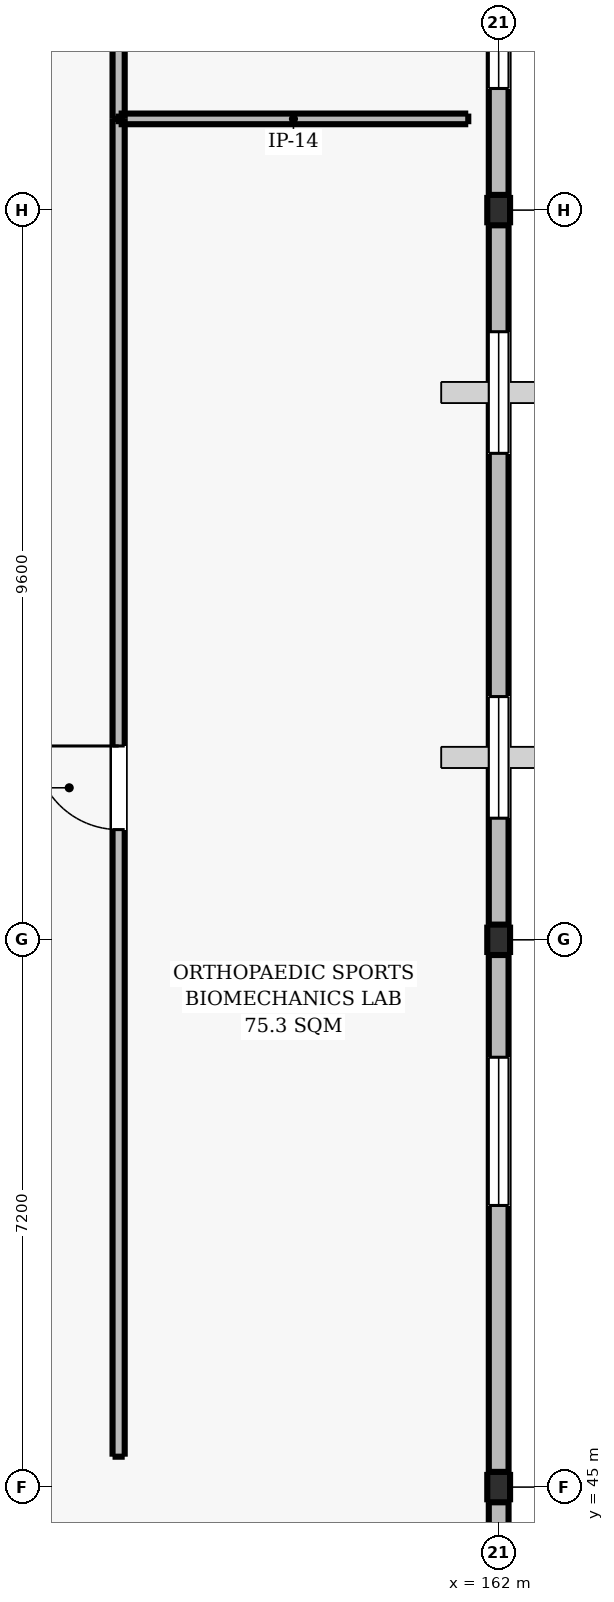
"""IFC4 building model, lengths in metres.
Left out: names, types, materials, properties, quantities, classifications, styles, units other than length and angle.
Written with IfcOpenShell. Run it as: python <this file> out.ifc"""

import sys

from ifc_helpers import new_model, si_unit, direction, frame, frame_2d, origin, origin_2d, place, context, subcontext, project, spatial, rectangle, i_section, extrude, element, fill, save


model = new_model("IFC4")
c1 = context("Model", 3, precision=1e-05, world=origin(), true_north=direction((0.0, 1.0)))
c2 = subcontext(c1, "Body", "Model", "MODEL_VIEW")
j1 = project(units=[si_unit("LENGTHUNIT", "METRE"), si_unit("PLANEANGLEUNIT", "RADIAN")], contexts=[c1])
p1 = place(None, origin())
s1 = spatial("IfcSite", under=j1, at=p1, CompositionType="ELEMENT")
p2 = place(p1, origin())
s2 = spatial("IfcBuilding", under=s1, at=p2, CompositionType="ELEMENT")
p3 = place(p2, frame((0.0, 0.0, 9.6)))
s3 = spatial("IfcBuildingStorey", under=s2, at=p3, CompositionType="ELEMENT", Elevation=9.6)
for number, where, z_axis, x_axis in (
    (1, (162.0, 45.0, 0.0), (0.0, 0.0, 1.0), (1.0, 0.0, 0.0)),
    (2, (162.0, 52.2, 0.0), (0.0, 0.0, 1.0), (1.0, 0.0, 0.0)),
    (3, (162.0, 61.8, 0.0), (0.0, 0.0, 1.0), (1.0, 0.0, 0.0)),
):
    element("IfcColumn", number, at=place(p3, frame(where, z_axis=z_axis, x_axis=x_axis)), inside=s3, PredefinedType="COLUMN", context=c2, shape_type="SweptSolid", body=[
        extrude(i_section(OverallWidth=0.3, OverallDepth=0.4, WebThickness=0.013, FlangeThickness=0.024, FilletRadius=0.027, at=origin_2d()), origin(), (0.0, 0.0, 1.0), 4.2),
    ])
p4 = place(p3, frame((162.0, 81.0, 0.0), z_axis=(0.0, 0.0, 1.0), x_axis=(0.0, -1.0, 0.0)))
e4 = element("IfcWall", 4, at=p4, inside=s3, PredefinedType="SOLIDWALL", context=c2, shape_type="SweptSolid", body=[
    extrude(rectangle(XDim=28.8, YDim=0.26, at=frame_2d((14.4, 0.0))), origin(), (0.0, 0.0, 1.0), 3.53),
])
p5 = place(p4, frame((1.6, 0.0, 0.965)))
e5 = element("IfcOpeningElement", 5, at=p5, cuts=e4, PredefinedType="OPENING", context=c2, shape_type="SweptSolid", body=[
    extrude(rectangle(XDim=1.6, YDim=1.6, at=frame_2d((0.8, 0.8))), frame((0.0, 0.14, 0.0), z_axis=(0.0, -1.0, 0.0), x_axis=(1.0, 0.0, 0.0)), (0.0, 0.0, 1.0), 0.28),
])
p6 = place(p4, frame((6.4, 0.0, 0.965)))
e6 = element("IfcOpeningElement", 6, at=p6, cuts=e4, PredefinedType="OPENING", context=c2, shape_type="SweptSolid", body=[
    extrude(rectangle(XDim=1.6, YDim=1.6, at=frame_2d((0.8, 0.8))), frame((0.0, 0.14, 0.0), z_axis=(0.0, -1.0, 0.0), x_axis=(1.0, 0.0, 0.0)), (0.0, 0.0, 1.0), 0.28),
])
p7 = place(p4, frame((11.2, 0.0, 0.965)))
e7 = element("IfcOpeningElement", 7, at=p7, cuts=e4, PredefinedType="OPENING", context=c2, shape_type="SweptSolid", body=[
    extrude(rectangle(XDim=1.6, YDim=1.6, at=frame_2d((0.8, 0.8))), frame((0.0, 0.14, 0.0), z_axis=(0.0, -1.0, 0.0), x_axis=(1.0, 0.0, 0.0)), (0.0, 0.0, 1.0), 0.28),
])
p8 = place(p4, frame((16.0, 0.0, 0.965)))
e8 = element("IfcOpeningElement", 8, at=p8, cuts=e4, PredefinedType="OPENING", context=c2, shape_type="SweptSolid", body=[
    extrude(rectangle(XDim=1.6, YDim=1.6, at=frame_2d((0.8, 0.8))), frame((0.0, 0.14, 0.0), z_axis=(0.0, -1.0, 0.0), x_axis=(1.0, 0.0, 0.0)), (0.0, 0.0, 1.0), 0.28),
])
p9 = place(p4, frame((20.8, 0.0, 0.965)))
e9 = element("IfcOpeningElement", 9, at=p9, cuts=e4, PredefinedType="OPENING", context=c2, shape_type="SweptSolid", body=[
    extrude(rectangle(XDim=1.6, YDim=1.6, at=frame_2d((0.8, 0.8))), frame((0.0, 0.14, 0.0), z_axis=(0.0, -1.0, 0.0), x_axis=(1.0, 0.0, 0.0)), (0.0, 0.0, 1.0), 0.28),
])
p10 = place(p4, frame((25.6, 0.0, 0.965)))
e10 = element("IfcOpeningElement", 10, at=p10, cuts=e4, PredefinedType="OPENING", context=c2, shape_type="SweptSolid", body=[
    extrude(rectangle(XDim=1.6, YDim=1.6, at=frame_2d((0.8, 0.8))), frame((0.0, 0.14, 0.0), z_axis=(0.0, -1.0, 0.0), x_axis=(1.0, 0.0, 0.0)), (0.0, 0.0, 1.0), 0.28),
])
p11 = place(p3, frame((162.0, 52.2, 0.0), z_axis=(0.0, 0.0, 1.0), x_axis=(0.0, -1.0, 0.0)))
e11 = element("IfcWall", 11, at=p11, inside=s3, PredefinedType="SOLIDWALL", context=c2, shape_type="SweptSolid", body=[
    extrude(rectangle(XDim=25.2, YDim=0.26, at=frame_2d((12.6, 0.0))), origin(), (0.0, 0.0, 1.0), 3.53),
])
p12 = place(p11, frame((1.545, 0.0, 0.95)))
e12 = element("IfcOpeningElement", 12, at=p12, cuts=e11, PredefinedType="OPENING", context=c2, shape_type="SweptSolid", body=[
    extrude(rectangle(XDim=1.95, YDim=1.65, at=frame_2d((0.975, 0.825))), frame((0.0, 0.14, 0.0), z_axis=(0.0, -1.0, 0.0), x_axis=(1.0, 0.0, 0.0)), (0.0, 0.0, 1.0), 0.28),
])
p13 = place(p11, frame((11.625, 0.0, 0.95)))
e13 = element("IfcOpeningElement", 13, at=p13, cuts=e11, PredefinedType="OPENING", context=c2, shape_type="SweptSolid", body=[
    extrude(rectangle(XDim=1.95, YDim=1.65, at=frame_2d((0.975, 0.825))), frame((0.0, 0.14, 0.0), z_axis=(0.0, -1.0, 0.0), x_axis=(1.0, 0.0, 0.0)), (0.0, 0.0, 1.0), 0.28),
])
p14 = place(p11, frame((21.705, 0.0, 0.95)))
e14 = element("IfcOpeningElement", 14, at=p14, cuts=e11, PredefinedType="OPENING", context=c2, shape_type="SweptSolid", body=[
    extrude(rectangle(XDim=1.95, YDim=1.65, at=frame_2d((0.975, 0.825))), frame((0.0, 0.14, 0.0), z_axis=(0.0, -1.0, 0.0), x_axis=(1.0, 0.0, 0.0)), (0.0, 0.0, 1.0), 0.28),
])
p15 = place(p3, frame((157.0, 45.4, 0.0), z_axis=(0.0, 0.0, 1.0), x_axis=(0.0, 1.0, 0.0)))
e15 = element("IfcWall", 15, at=p15, inside=s3, PredefinedType="PARTITIONING", context=c2, shape_type="SweptSolid", body=[
    extrude(rectangle(XDim=17.6, YDim=0.16, at=frame_2d((8.8, 0.0))), origin(), (0.0, 0.0, 1.0), 3.93),
])
p16 = place(p15, frame((8.25, 0.0, 0.0)))
e16 = element("IfcOpeningElement", 16, at=p16, cuts=e15, PredefinedType="OPENING", context=c2, shape_type="SweptSolid", body=[
    extrude(rectangle(XDim=1.1, YDim=2.15, at=frame_2d((0.55, 1.075))), frame((0.0, 0.09, 0.0), z_axis=(0.0, -1.0, 0.0), x_axis=(1.0, 0.0, 0.0)), (0.0, 0.0, 1.0), 0.18),
])
p17 = place(p3, frame((157.0, 63.0, 0.0), z_axis=(0.0, 0.0, 1.0), x_axis=(1.0, 0.0, 0.0)))
e17 = element("IfcWall", 17, at=p17, inside=s3, PredefinedType="PARTITIONING", context=c2, shape_type="SweptSolid", body=[
    extrude(rectangle(XDim=4.6, YDim=0.14, at=frame_2d((2.3, 0.0))), origin(), (0.0, 0.0, 1.0), 3.93),
])
p18 = place(p3, frame((157.0, 63.0, 0.0), z_axis=(0.0, 0.0, 1.0), x_axis=(0.0, 1.0, 0.0)))
e18 = element("IfcWall", 18, at=p18, inside=s3, PredefinedType="PARTITIONING", context=c2, shape_type="SweptSolid", body=[
    extrude(rectangle(XDim=17.6, YDim=0.16, at=frame_2d((8.8, 0.0))), origin(), (0.0, 0.0, 1.0), 3.93),
])
p19 = place(p18, frame((8.25, 0.0, 0.0)))
e19 = element("IfcOpeningElement", 19, at=p19, cuts=e18, PredefinedType="OPENING", context=c2, shape_type="SweptSolid", body=[
    extrude(rectangle(XDim=1.1, YDim=2.15, at=frame_2d((0.55, 1.075))), frame((0.0, 0.09, 0.0), z_axis=(0.0, -1.0, 0.0), x_axis=(1.0, 0.0, 0.0)), (0.0, 0.0, 1.0), 0.18),
])
p20 = place(p8, origin())
e20 = element("IfcWindow", 20, at=p20, inside=s3, PartitioningType="SINGLE_PANEL", PredefinedType="WINDOW", context=c2, shape_type="SweptSolid", body=[
    extrude(rectangle(XDim=1.6, YDim=1.6, at=frame_2d((0.8, 0.8))), frame((0.0, 0.03, 0.0), z_axis=(0.0, -1.0, 0.0), x_axis=(1.0, 0.0, 0.0)), (0.0, 0.0, 1.0), 0.06),
])
fill(e8, e20)
p21 = place(p9, origin())
e21 = element("IfcWindow", 21, at=p21, inside=s3, PartitioningType="SINGLE_PANEL", PredefinedType="WINDOW", context=c2, shape_type="SweptSolid", body=[
    extrude(rectangle(XDim=1.6, YDim=1.6, at=frame_2d((0.8, 0.8))), frame((0.0, 0.03, 0.0), z_axis=(0.0, -1.0, 0.0), x_axis=(1.0, 0.0, 0.0)), (0.0, 0.0, 1.0), 0.06),
])
fill(e9, e21)
p22 = place(p10, origin())
e22 = element("IfcWindow", 22, at=p22, inside=s3, PartitioningType="SINGLE_PANEL", PredefinedType="WINDOW", context=c2, shape_type="SweptSolid", body=[
    extrude(rectangle(XDim=1.6, YDim=1.6, at=frame_2d((0.8, 0.8))), frame((0.0, 0.03, 0.0), z_axis=(0.0, -1.0, 0.0), x_axis=(1.0, 0.0, 0.0)), (0.0, 0.0, 1.0), 0.06),
])
fill(e10, e22)
p23 = place(p12, origin())
e23 = element("IfcWindow", 23, at=p23, inside=s3, PartitioningType="SINGLE_PANEL", PredefinedType="WINDOW", context=c2, shape_type="SweptSolid", body=[
    extrude(rectangle(XDim=1.95, YDim=1.65, at=frame_2d((0.975, 0.825))), frame((0.0, 0.03, 0.0), z_axis=(0.0, -1.0, 0.0), x_axis=(1.0, 0.0, 0.0)), (0.0, 0.0, 1.0), 0.06),
])
fill(e12, e23)
p24 = place(p16, origin())
e24 = element("IfcDoor", 24, at=p24, inside=s3, OperationType="SINGLE_SWING_RIGHT", PredefinedType="DOOR", context=c2, shape_type="SweptSolid", body=[
    extrude(rectangle(XDim=1.1, YDim=2.15, at=frame_2d((0.55, 1.075))), frame((0.0, 0.025, 0.0), z_axis=(0.0, -1.0, 0.0), x_axis=(1.0, 0.0, 0.0)), (0.0, 0.0, 1.0), 0.05),
])
fill(e16, e24)
save(model, sys.argv[1])
